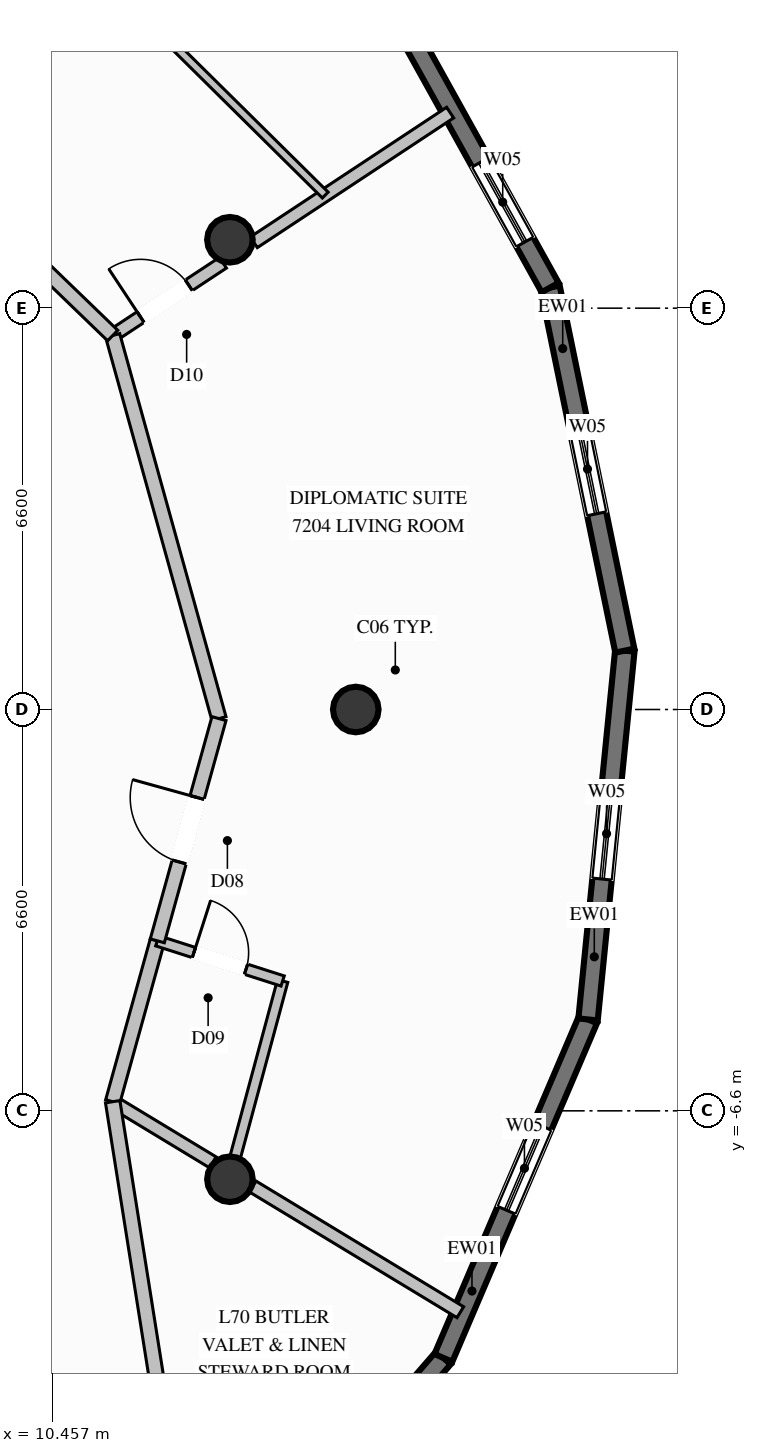
"""IFC4 building model, lengths in metres.
Left out: names, types, materials, properties, quantities, classifications, styles, units other than length and angle.
Written with IfcOpenShell. Run it as: python <this file> out.ifc"""

import sys

from ifc_helpers import new_model, si_unit, direction, frame, frame_2d, origin, origin_2d, place, context, subcontext, project, spatial, rectangle, circle, extrude, element, fill, save


model = new_model("IFC4")
c1 = context("Model", 3, precision=1e-05, world=origin(), true_north=direction((0.0, 1.0)))
c2 = subcontext(c1, "Body", "Model", "MODEL_VIEW")
j1 = project(units=[si_unit("LENGTHUNIT", "METRE"), si_unit("PLANEANGLEUNIT", "RADIAN")], contexts=[c1])
p1 = place(None, origin())
s1 = spatial("IfcSite", under=j1, at=p1, CompositionType="ELEMENT")
p2 = place(p1, origin())
s2 = spatial("IfcBuilding", under=s1, at=p2, CompositionType="ELEMENT")
p3 = place(p2, frame((0.0, 0.0, 270.6)))
s3 = spatial("IfcBuildingStorey", under=s2, at=p3, CompositionType="ELEMENT", Elevation=270.6)
for number, where, z_axis, x_axis in (
    (1, (15.45, 0.0, 0.0), (0.0, 0.0, 1.0), (1.0, 0.0, 0.0)),
    (2, (13.38, 7.725, 0.0), (0.0, 0.0, 1.0), (1.0, 0.0, 0.0)),
    (3, (13.38, -7.725, 0.0), (0.0, 0.0, 1.0), (1.0, 0.0, 0.0)),
):
    element("IfcColumn", number, at=place(p3, frame(where, z_axis=z_axis, x_axis=x_axis)), inside=s3, PredefinedType="COLUMN", context=c2, shape_type="SweptSolid", body=[
        extrude(circle(Radius=0.375, at=origin_2d()), origin(), (0.0, 0.0, 1.0), 3.8),
    ])
p4 = place(p3, frame((16.891, -10.663, 0.0), z_axis=(0.0, 0.0, 1.0), x_axis=(-0.654956937311, -0.755666202941, 0.0)))
e4 = element("IfcWall", 4, at=p4, inside=s3, PredefinedType="SOLIDWALL", context=c2, shape_type="SweptSolid", body=[
    extrude(rectangle(XDim=5.985, YDim=0.32, at=frame_2d((2.993, 0.0))), origin(), (0.0, 0.0, 1.0), 3.57),
])
p5 = place(p4, frame((1.927, 0.0, 0.85)))
e5 = element("IfcOpeningElement", 5, at=p5, cuts=e4, PredefinedType="OPENING", context=c2, shape_type="SweptSolid", body=[
    extrude(rectangle(XDim=1.5, YDim=1.2, at=frame_2d((0.75, 0.6))), frame((0.0, 0.17, 0.0), z_axis=(0.0, -1.0, 0.0), x_axis=(1.0, 0.0, 0.0)), (0.0, 0.0, 1.0), 0.34),
])
p6 = place(p3, frame((19.27, -5.097, 0.0), z_axis=(0.0, 0.0, 1.0), x_axis=(-0.392999104836, -0.919538853773, 0.0)))
e6 = element("IfcWall", 6, at=p6, inside=s3, PredefinedType="SOLIDWALL", context=c2, shape_type="SweptSolid", body=[
    extrude(rectangle(XDim=6.053, YDim=0.32, at=frame_2d((3.027, 0.0))), origin(), (0.0, 0.0, 1.0), 3.57),
])
p7 = place(p6, frame((1.912, 0.0, 0.85)))
e7 = element("IfcOpeningElement", 7, at=p7, cuts=e6, PredefinedType="OPENING", context=c2, shape_type="SweptSolid", body=[
    extrude(rectangle(XDim=1.5, YDim=1.2, at=frame_2d((0.75, 0.6))), frame((0.0, 0.17, 0.0), z_axis=(0.0, -1.0, 0.0), x_axis=(1.0, 0.0, 0.0)), (0.0, 0.0, 1.0), 0.34),
])
p8 = place(p3, frame((19.875, 0.968, 0.0), z_axis=(0.0, 0.0, 1.0), x_axis=(-0.09925782999, -0.995061748429, 0.0)))
e8 = element("IfcWall", 8, at=p8, inside=s3, PredefinedType="SOLIDWALL", context=c2, shape_type="SweptSolid", body=[
    extrude(rectangle(XDim=6.095, YDim=0.32, at=frame_2d((3.047, 0.0))), origin(), (0.0, 0.0, 1.0), 3.57),
])
p9 = place(p8, frame((2.275, 0.0, 0.85)))
e9 = element("IfcOpeningElement", 9, at=p9, cuts=e8, PredefinedType="OPENING", context=c2, shape_type="SweptSolid", body=[
    extrude(rectangle(XDim=1.5, YDim=1.2, at=frame_2d((0.75, 0.6))), frame((0.0, 0.17, 0.0), z_axis=(0.0, -1.0, 0.0), x_axis=(1.0, 0.0, 0.0)), (0.0, 0.0, 1.0), 0.34),
])
p10 = place(p3, frame((18.647, 6.939, 0.0), z_axis=(0.0, 0.0, 1.0), x_axis=(0.201450639807, -0.979498667545, 0.0)))
e10 = element("IfcWall", 10, at=p10, inside=s3, PredefinedType="SOLIDWALL", context=c2, shape_type="SweptSolid", body=[
    extrude(rectangle(XDim=6.096, YDim=0.32, at=frame_2d((3.048, 0.0))), origin(), (0.0, 0.0, 1.0), 3.57),
])
p11 = place(p10, frame((2.298, 0.0, 0.85)))
e11 = element("IfcOpeningElement", 11, at=p11, cuts=e10, PredefinedType="OPENING", context=c2, shape_type="SweptSolid", body=[
    extrude(rectangle(XDim=1.5, YDim=1.2, at=frame_2d((0.75, 0.6))), frame((0.0, 0.17, 0.0), z_axis=(0.0, -1.0, 0.0), x_axis=(1.0, 0.0, 0.0)), (0.0, 0.0, 1.0), 0.34),
])
p12 = place(p3, frame((15.707, 12.23, 0.0), z_axis=(0.0, 0.0, 1.0), x_axis=(0.485704572822, -0.87412302792, 0.0)))
e12 = element("IfcWall", 12, at=p12, inside=s3, PredefinedType="SOLIDWALL", context=c2, shape_type="SweptSolid", body=[
    extrude(rectangle(XDim=6.053, YDim=0.32, at=frame_2d((3.026, 0.0))), origin(), (0.0, 0.0, 1.0), 3.57),
])
p13 = place(p12, frame((3.696, 0.0, 0.85)))
e13 = element("IfcOpeningElement", 13, at=p13, cuts=e12, PredefinedType="OPENING", context=c2, shape_type="SweptSolid", body=[
    extrude(rectangle(XDim=1.5, YDim=1.2, at=frame_2d((0.75, 0.6))), frame((0.0, 0.17, 0.0), z_axis=(0.0, -1.0, 0.0), x_axis=(1.0, 0.0, 0.0)), (0.0, 0.0, 1.0), 0.34),
])
p14 = place(p3, frame((11.452, 6.15, 0.0), z_axis=(0.0, 0.0, 1.0), x_axis=(0.834514332086, 0.550986233533, 0.0)))
e14 = element("IfcWall", 14, at=p14, inside=s3, PredefinedType="PARTITIONING", context=c2, shape_type="SweptSolid", body=[
    extrude(rectangle(XDim=2.173, YDim=0.21, at=frame_2d((1.086, 0.0))), origin(), (0.0, 0.0, 1.0), 3.011),
])
p15 = place(p14, frame((0.55, 0.0, 0.0)))
e15 = element("IfcOpeningElement", 15, at=p15, cuts=e14, PredefinedType="OPENING", context=c2, shape_type="SweptSolid", body=[
    extrude(rectangle(XDim=0.95, YDim=2.1, at=frame_2d((0.475, 1.05))), frame((0.0, 0.115, 0.0), z_axis=(0.0, -1.0, 0.0), x_axis=(1.0, 0.0, 0.0)), (0.0, 0.0, 1.0), 0.23),
])
p16 = place(p3, frame((13.773, 7.683, 0.0), z_axis=(0.0, 0.0, 1.0), x_axis=(0.834410963212, 0.551142762333, 0.0)))
e16 = element("IfcWall", 16, at=p16, inside=s3, PredefinedType="PARTITIONING", context=c2, shape_type="SweptSolid", body=[
    extrude(rectangle(XDim=3.87, YDim=0.21, at=frame_2d((1.935, 0.0))), origin(), (0.0, 0.0, 1.0), 3.57),
])
p17 = place(p3, frame((11.452, -6.45, 0.0), z_axis=(0.0, 0.0, 1.0), x_axis=(0.85548381957, -0.517829541889, 0.0)))
e17 = element("IfcWall", 17, at=p17, inside=s3, PredefinedType="PARTITIONING", context=c2, shape_type="SweptSolid", body=[
    extrude(rectangle(XDim=1.926, YDim=0.21, at=frame_2d((0.963, 0.0))), origin(), (0.0, 0.0, 1.0), 3.011),
])
p18 = place(p3, frame((13.756, -7.845, 0.0), z_axis=(0.0, 0.0, 1.0), x_axis=(0.855336694692, -0.518072522638, 0.0)))
e18 = element("IfcWall", 18, at=p18, inside=s3, PredefinedType="PARTITIONING", context=c2, shape_type="SweptSolid", body=[
    extrude(rectangle(XDim=3.99, YDim=0.21, at=frame_2d((1.995, 0.0))), origin(), (0.0, 0.0, 1.0), 3.57),
])
p19 = place(p3, frame((11.452, -6.45, 0.0), z_axis=(0.0, 0.0, 1.0), x_axis=(0.267350374135, 0.963599386389, 0.0)))
e19 = element("IfcWall", 19, at=p19, inside=s3, PredefinedType="PARTITIONING", context=c2, shape_type="SweptSolid", body=[
    extrude(rectangle(XDim=2.746, YDim=0.24, at=frame_2d((1.373, 0.0))), origin(), (0.0, 0.0, 1.0), 3.57),
])
p20 = place(p3, frame((13.396, -7.627, 0.0), z_axis=(0.0, 0.0, 1.0), x_axis=(0.259917321364, 0.965630874638, 0.0)))
e20 = element("IfcWall", 20, at=p20, inside=s3, PredefinedType="PLUMBINGWALL", context=c2, shape_type="SweptSolid", body=[
    extrude(rectangle(XDim=3.274, YDim=0.175, at=frame_2d((1.637, 0.0))), origin(), (0.0, 0.0, 1.0), 3.138),
])
p21 = place(p3, frame((12.186, -3.804, 0.0), z_axis=(0.0, 0.0, 1.0), x_axis=(0.952209126852, -0.305446850926, 0.0)))
e21 = element("IfcWall", 21, at=p21, inside=s3, PredefinedType="PLUMBINGWALL", context=c2, shape_type="SweptSolid", body=[
    extrude(rectangle(XDim=2.165, YDim=0.175, at=frame_2d((1.082, 0.0))), origin(), (0.0, 0.0, 1.0), 3.57),
])
p22 = place(p21, frame((0.632, 0.0, 0.0)))
e22 = element("IfcOpeningElement", 22, at=p22, cuts=e21, PredefinedType="OPENING", context=c2, shape_type="SweptSolid", body=[
    extrude(rectangle(XDim=0.9, YDim=2.1, at=frame_2d((0.45, 1.05))), frame((0.0, 0.098, 0.0), z_axis=(0.0, -1.0, 0.0), x_axis=(1.0, 0.0, 0.0)), (0.0, 0.0, 1.0), 0.195),
])
p23 = place(p3, frame((13.2, -0.15, 0.0), z_axis=(0.0, 0.0, 1.0), x_axis=(-0.267374214985, 0.963592771435, 0.0)))
e23 = element("IfcWall", 23, at=p23, inside=s3, PredefinedType="PARTITIONING", context=c2, shape_type="SweptSolid", body=[
    extrude(rectangle(XDim=6.538, YDim=0.24, at=frame_2d((3.269, 0.0))), origin(), (0.0, 0.0, 1.0), 3.57),
])
p24 = place(p3, frame((12.186, -3.804, 0.0), z_axis=(0.0, 0.0, 1.0), x_axis=(0.267374891444, 0.963592583733, 0.0)))
e24 = element("IfcWall", 24, at=p24, inside=s3, PredefinedType="PARTITIONING", context=c2, shape_type="SweptSolid", body=[
    extrude(rectangle(XDim=3.792, YDim=0.24, at=frame_2d((1.896, 0.0))), origin(), (0.0, 0.0, 1.0), 3.57),
])
p25 = place(p24, frame((1.346, 0.0, 0.0)))
e25 = element("IfcOpeningElement", 25, at=p25, cuts=e24, PredefinedType="OPENING", context=c2, shape_type="SweptSolid", body=[
    extrude(rectangle(XDim=1.1, YDim=2.3, at=frame_2d((0.55, 1.15))), frame((0.0, 0.13, 0.0), z_axis=(0.0, -1.0, 0.0), x_axis=(1.0, 0.0, 0.0)), (0.0, 0.0, 1.0), 0.26),
])
p26 = place(p3, frame((11.452, 6.15, 0.0), z_axis=(0.0, 0.0, 1.0), x_axis=(-0.719407162497, 0.694588608133, 0.0)))
e26 = element("IfcWall", 26, at=p26, inside=s3, PredefinedType="PARTITIONING", context=c2, shape_type="SweptSolid", body=[
    extrude(rectangle(XDim=6.64, YDim=0.24, at=frame_2d((3.32, 0.0))), origin(), (0.0, 0.0, 1.0), 3.57),
])
p27 = place(p3, frame((14.948, 8.46, 0.0), z_axis=(0.0, 0.0, 1.0), x_axis=(-0.710996539207, 0.703195507121, 0.0)))
e27 = element("IfcWall", 27, at=p27, inside=s3, PredefinedType="PARTITIONING", context=c2, shape_type="SweptSolid", body=[
    extrude(rectangle(XDim=8.857, YDim=0.135, at=frame_2d((4.428, 0.0))), origin(), (0.0, 0.0, 1.0), 3.57),
])
p28 = place(p27, frame((3.953, 0.0, 0.0)))
e28 = element("IfcOpeningElement", 28, at=p28, cuts=e27, PredefinedType="OPENING", context=c2, shape_type="SweptSolid", body=[
    extrude(rectangle(XDim=0.95, YDim=2.1, at=frame_2d((0.475, 1.05))), frame((0.0, 0.078, 0.0), z_axis=(0.0, -1.0, 0.0), x_axis=(1.0, 0.0, 0.0)), (0.0, 0.0, 1.0), 0.155),
])
p29 = place(p3, frame((12.3, -11.8, 0.0), z_axis=(0.0, 0.0, 1.0), x_axis=(-0.156573548098, 0.987666301964, 0.0)))
e29 = element("IfcWall", 29, at=p29, inside=s3, PredefinedType="PARTITIONING", context=c2, shape_type="SweptSolid", body=[
    extrude(rectangle(XDim=5.417, YDim=0.24, at=frame_2d((2.708, 0.0))), origin(), (0.0, 0.0, 1.0), 3.57),
])
p30 = place(p7, origin())
e30 = element("IfcWindow", 30, at=p30, inside=s3, PartitioningType="SINGLE_PANEL", PredefinedType="WINDOW", context=c2, shape_type="SweptSolid", body=[
    extrude(rectangle(XDim=1.5, YDim=1.2, at=frame_2d((0.75, 0.6))), frame((0.0, 0.03, 0.0), z_axis=(0.0, -1.0, 0.0), x_axis=(1.0, 0.0, 0.0)), (0.0, 0.0, 1.0), 0.06),
])
fill(e7, e30)
p31 = place(p9, origin())
e31 = element("IfcWindow", 31, at=p31, inside=s3, PartitioningType="SINGLE_PANEL", PredefinedType="WINDOW", context=c2, shape_type="SweptSolid", body=[
    extrude(rectangle(XDim=1.5, YDim=1.2, at=frame_2d((0.75, 0.6))), frame((0.0, 0.03, 0.0), z_axis=(0.0, -1.0, 0.0), x_axis=(1.0, 0.0, 0.0)), (0.0, 0.0, 1.0), 0.06),
])
fill(e9, e31)
p32 = place(p11, origin())
e32 = element("IfcWindow", 32, at=p32, inside=s3, PartitioningType="SINGLE_PANEL", PredefinedType="WINDOW", context=c2, shape_type="SweptSolid", body=[
    extrude(rectangle(XDim=1.5, YDim=1.2, at=frame_2d((0.75, 0.6))), frame((0.0, 0.03, 0.0), z_axis=(0.0, -1.0, 0.0), x_axis=(1.0, 0.0, 0.0)), (0.0, 0.0, 1.0), 0.06),
])
fill(e11, e32)
p33 = place(p13, origin())
e33 = element("IfcWindow", 33, at=p33, inside=s3, PartitioningType="SINGLE_PANEL", PredefinedType="WINDOW", context=c2, shape_type="SweptSolid", body=[
    extrude(rectangle(XDim=1.5, YDim=1.2, at=frame_2d((0.75, 0.6))), frame((0.0, 0.03, 0.0), z_axis=(0.0, -1.0, 0.0), x_axis=(1.0, 0.0, 0.0)), (0.0, 0.0, 1.0), 0.06),
])
fill(e13, e33)
p34 = place(p22, origin())
e34 = element("IfcDoor", 34, at=p34, inside=s3, OperationType="SINGLE_SWING_LEFT", PredefinedType="DOOR", context=c2, shape_type="SweptSolid", body=[
    extrude(rectangle(XDim=0.9, YDim=2.1, at=frame_2d((0.45, 1.05))), frame((0.0, 0.025, 0.0), z_axis=(0.0, -1.0, 0.0), x_axis=(1.0, 0.0, 0.0)), (0.0, 0.0, 1.0), 0.05),
])
fill(e22, e34)
p35 = place(p25, origin())
e35 = element("IfcDoor", 35, at=p35, inside=s3, OperationType="SINGLE_SWING_RIGHT", PredefinedType="DOOR", context=c2, shape_type="SweptSolid", body=[
    extrude(rectangle(XDim=1.1, YDim=2.3, at=frame_2d((0.55, 1.15))), frame((0.0, 0.025, 0.0), z_axis=(0.0, -1.0, 0.0), x_axis=(1.0, 0.0, 0.0)), (0.0, 0.0, 1.0), 0.05),
])
fill(e25, e35)
p36 = place(p15, origin())
e36 = element("IfcDoor", 36, at=p36, inside=s3, OperationType="SINGLE_SWING_LEFT", PredefinedType="DOOR", context=c2, shape_type="SweptSolid", body=[
    extrude(rectangle(XDim=0.95, YDim=2.1, at=frame_2d((0.475, 1.05))), frame((0.0, 0.025, 0.0), z_axis=(0.0, -1.0, 0.0), x_axis=(1.0, 0.0, 0.0)), (0.0, 0.0, 1.0), 0.05),
])
fill(e15, e36)
save(model, sys.argv[1])
